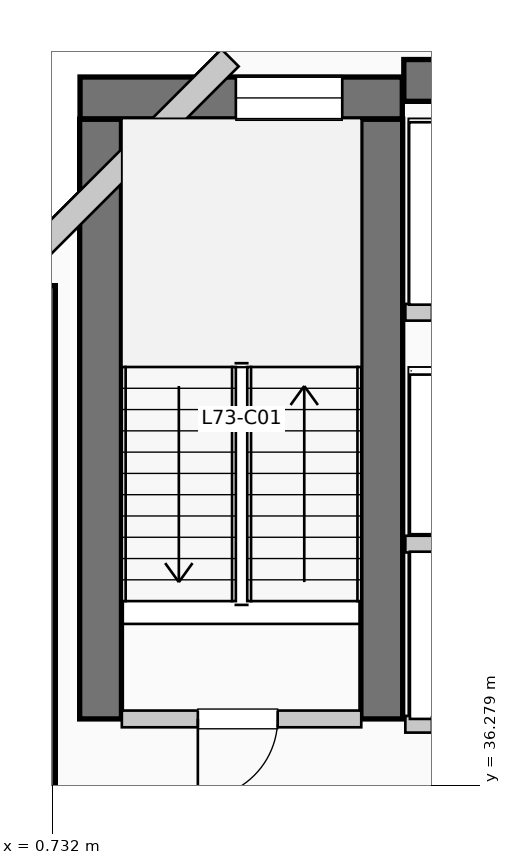
"""IFC4 building model, lengths in metres.
Left out: names, types, materials, properties, quantities, classifications, styles, units other than length and angle.
Written with IfcOpenShell. Run it as: python <this file> out.ifc"""

import sys

from ifc_helpers import new_model, si_unit, direction, frame, frame_2d, origin, place, context, subcontext, project, spatial, rectangle, extrude, element, fill, save


model = new_model("IFC4")
c1 = context("Model", 3, precision=1e-05, world=origin(), true_north=direction((0.0, 1.0)))
c2 = subcontext(c1, "Body", "Model", "MODEL_VIEW")
j1 = project(units=[si_unit("LENGTHUNIT", "METRE"), si_unit("PLANEANGLEUNIT", "RADIAN")], contexts=[c1])
p1 = place(None, origin())
s1 = spatial("IfcSite", under=j1, at=p1, CompositionType="ELEMENT")
p2 = place(p1, origin())
s2 = spatial("IfcBuilding", under=s1, at=p2, CompositionType="ELEMENT")
p3 = place(p2, frame((0.0, 0.0, 299.97)))
s3 = spatial("IfcBuildingStorey", under=s2, at=p3, CompositionType="ELEMENT", Elevation=299.97)
p4 = place(p3, frame((5.36, 45.55, 0.0), z_axis=(0.0, 0.0, 1.0), x_axis=(1.0, 0.0, 0.0)))
e1 = element("IfcWall", 1, at=p4, inside=s3, PredefinedType="SHEAR", context=c2, shape_type="SweptSolid", body=[
    extrude(rectangle(XDim=13.98, YDim=0.55, at=frame_2d((6.99, 0.0))), origin(), (0.0, 0.0, 1.0), 3.96),
])
p5 = place(p3, frame((0.5, 34.95, 0.0), z_axis=(0.0, 0.0, 1.0), x_axis=(0.0, 1.0, 0.0)))
e2 = element("IfcWall", 2, at=p5, inside=s3, PredefinedType="SHEAR", context=c2, shape_type="SweptSolid", body=[
    extrude(rectangle(XDim=7.9, YDim=0.55, at=frame_2d((3.95, 0.0))), origin(), (0.0, 0.0, 1.0), 3.96),
])
for number, where, z_axis, x_axis in (
    (3, (1.37, 37.15, 0.0), (0.0, 0.0, 1.0), (0.0, 1.0, 0.0)),
    (4, (5.07, 37.15, 0.0), (0.0, 0.0, 1.0), (0.0, 1.0, 0.0)),
):
    element("IfcWall", number, at=place(p3, frame(where, z_axis=z_axis, x_axis=x_axis)), inside=s3, PredefinedType="SHEAR", context=c2, shape_type="SweptSolid", body=[
        extrude(rectangle(XDim=7.89, YDim=0.55, at=frame_2d((3.945, 0.0))), origin(), (0.0, 0.0, 1.0), 3.96),
    ])
p6 = place(p3, frame((1.1, 45.32, 0.0), z_axis=(0.0, 0.0, 1.0), x_axis=(1.0, 0.0, 0.0)))
e5 = element("IfcWall", 5, at=p6, inside=s3, PredefinedType="SHEAR", context=c2, shape_type="SweptSolid", body=[
    extrude(rectangle(XDim=4.24, YDim=0.55, at=frame_2d((2.12, 0.0))), origin(), (0.0, 0.0, 1.0), 3.96),
])
p7 = place(p6, frame((2.05, 0.0, 1.05)))
e6 = element("IfcOpeningElement", 6, at=p7, cuts=e5, PredefinedType="OPENING", context=c2, shape_type="SweptSolid", body=[
    extrude(rectangle(XDim=1.4, YDim=1.8, at=frame_2d((0.7, 0.9))), frame((0.0, 0.285, 0.0), z_axis=(0.0, -1.0, 0.0), x_axis=(1.0, 0.0, 0.0)), (0.0, 0.0, 1.0), 0.57),
])
p8 = place(p3, frame((3.074, 45.848, 0.0), z_axis=(0.0, 0.0, 1.0), x_axis=(-0.707106781187, -0.707106781187, 0.0)))
e7 = element("IfcWall", 7, at=p8, inside=s3, PredefinedType="SOLIDWALL", context=c2, shape_type="SweptSolid", body=[
    extrude(rectangle(XDim=4.133, YDim=0.32, at=frame_2d((2.066, 0.0))), origin(), (0.0, 0.0, 1.0), 3.74),
])
p9 = place(p3, frame((1.65, 37.15, 0.0), z_axis=(0.0, 0.0, 1.0), x_axis=(1.0, 0.0, 0.0)))
e8 = element("IfcWall", 8, at=p9, inside=s3, PredefinedType="PARTITIONING", context=c2, shape_type="SweptSolid", body=[
    extrude(rectangle(XDim=3.15, YDim=0.22, at=frame_2d((1.575, 0.0))), origin(), (0.0, 0.0, 1.0), 3.74),
])
p10 = place(p9, frame((2.05, 0.0, 0.0), z_axis=(0.0, 0.0, 1.0), x_axis=(-1.0, 0.0, 0.0)))
e9 = element("IfcOpeningElement", 9, at=p10, cuts=e8, PredefinedType="OPENING", context=c2, shape_type="SweptSolid", body=[
    extrude(rectangle(XDim=1.05, YDim=2.15, at=frame_2d((0.525, 1.075))), frame((0.0, 0.12, 0.0), z_axis=(0.0, -1.0, 0.0), x_axis=(1.0, 0.0, 0.0)), (0.0, 0.0, 1.0), 0.24),
])
p11 = place(p3, frame((5.38, 37.08, 0.0), z_axis=(0.0, 0.0, 1.0), x_axis=(1.0, 0.0, 0.0)))
e10 = element("IfcWall", 10, at=p11, inside=s3, PredefinedType="PARTITIONING", context=c2, shape_type="SweptSolid", body=[
    extrude(rectangle(XDim=3.46, YDim=0.22, at=frame_2d((1.73, 0.0))), origin(), (0.0, 0.0, 1.0), 3.74),
])
p12 = place(p11, frame((1.55, 0.0, 0.0), z_axis=(0.0, 0.0, 1.0), x_axis=(-1.0, 0.0, 0.0)))
e11 = element("IfcOpeningElement", 11, at=p12, cuts=e10, PredefinedType="OPENING", context=c2, shape_type="SweptSolid", body=[
    extrude(rectangle(XDim=1.2, YDim=2.2, at=frame_2d((0.6, 1.1))), frame((0.0, 0.12, 0.0), z_axis=(0.0, -1.0, 0.0), x_axis=(1.0, 0.0, 0.0)), (0.0, 0.0, 1.0), 0.24),
])
p13 = place(p11, frame((3.22, 0.0, 0.0), z_axis=(0.0, 0.0, 1.0), x_axis=(-1.0, 0.0, 0.0)))
e12 = element("IfcOpeningElement", 12, at=p13, cuts=e10, PredefinedType="OPENING", context=c2, shape_type="SweptSolid", body=[
    extrude(rectangle(XDim=1.2, YDim=2.2, at=frame_2d((0.6, 1.1))), frame((0.0, 0.12, 0.0), z_axis=(0.0, -1.0, 0.0), x_axis=(1.0, 0.0, 0.0)), (0.0, 0.0, 1.0), 0.24),
])
p14 = place(p3, frame((5.38, 39.45, 0.0), z_axis=(0.0, 0.0, 1.0), x_axis=(1.0, 0.0, 0.0)))
e13 = element("IfcWall", 13, at=p14, inside=s3, PredefinedType="PARTITIONING", context=c2, shape_type="SweptSolid", body=[
    extrude(rectangle(XDim=3.46, YDim=0.22, at=frame_2d((1.73, 0.0))), origin(), (0.0, 0.0, 1.0), 3.74),
])
p15 = place(p3, frame((5.38, 42.5, 0.0), z_axis=(0.0, 0.0, 1.0), x_axis=(1.0, 0.0, 0.0)))
e14 = element("IfcWall", 14, at=p15, inside=s3, PredefinedType="PARTITIONING", context=c2, shape_type="SweptSolid", body=[
    extrude(rectangle(XDim=3.77, YDim=0.22, at=frame_2d((1.885, 0.0))), origin(), (0.0, 0.0, 1.0), 3.74),
])
p16 = place(p15, frame((1.75, 0.0, 0.0), z_axis=(0.0, 0.0, 1.0), x_axis=(-1.0, 0.0, 0.0)))
e15 = element("IfcOpeningElement", 15, at=p16, cuts=e14, PredefinedType="OPENING", context=c2, shape_type="SweptSolid", body=[
    extrude(rectangle(XDim=1.4, YDim=2.2, at=frame_2d((0.7, 1.1))), frame((0.0, 0.12, 0.0), z_axis=(0.0, -1.0, 0.0), x_axis=(1.0, 0.0, 0.0)), (0.0, 0.0, 1.0), 0.24),
])
p17 = place(p15, frame((3.53, 0.0, 0.0), z_axis=(0.0, 0.0, 1.0), x_axis=(-1.0, 0.0, 0.0)))
e16 = element("IfcOpeningElement", 16, at=p17, cuts=e14, PredefinedType="OPENING", context=c2, shape_type="SweptSolid", body=[
    extrude(rectangle(XDim=1.4, YDim=2.2, at=frame_2d((0.7, 1.1))), frame((0.0, 0.12, 0.0), z_axis=(0.0, -1.0, 0.0), x_axis=(1.0, 0.0, 0.0)), (0.0, 0.0, 1.0), 0.24),
])
p18 = place(p7, origin())
e17 = element("IfcWindow", 17, at=p18, inside=s3, PartitioningType="SINGLE_PANEL", PredefinedType="WINDOW", context=c2, shape_type="SweptSolid", body=[
    extrude(rectangle(XDim=1.4, YDim=1.8, at=frame_2d((0.7, 0.9))), frame((0.0, 0.03, 0.0), z_axis=(0.0, -1.0, 0.0), x_axis=(1.0, 0.0, 0.0)), (0.0, 0.0, 1.0), 0.06),
])
fill(e6, e17)
p19 = place(p10, origin())
e18 = element("IfcDoor", 18, at=p19, inside=s3, OperationType="SINGLE_SWING_LEFT", PredefinedType="DOOR", context=c2, shape_type="SweptSolid", body=[
    extrude(rectangle(XDim=1.05, YDim=2.15, at=frame_2d((0.525, 1.075))), frame((0.0, 0.025, 0.0), z_axis=(0.0, -1.0, 0.0), x_axis=(1.0, 0.0, 0.0)), (0.0, 0.0, 1.0), 0.05),
])
fill(e9, e18)
save(model, sys.argv[1])
